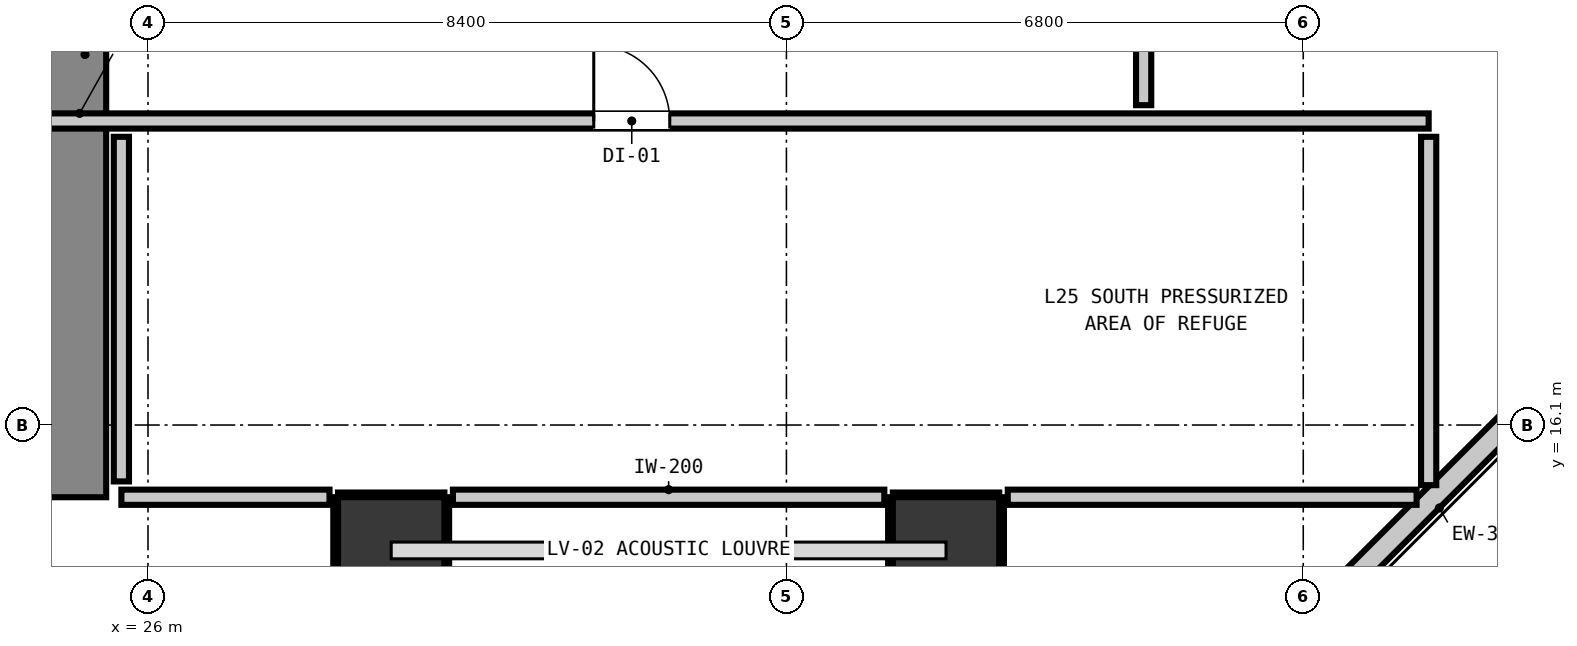
"""IFC4 building model, lengths in metres.
Left out: names, types, materials, properties, quantities, classifications, styles, units other than length and angle.
Written with IfcOpenShell. Run it as: python <this file> out.ifc"""

import sys

from ifc_helpers import new_model, si_unit, direction, frame, frame_2d, origin, origin_2d, place, context, subcontext, project, spatial, rectangle, extrude, element, fill, save


model = new_model("IFC4")
c1 = context("Model", 3, precision=1e-05, world=origin(), true_north=direction((0.0, 1.0)))
c2 = subcontext(c1, "Body", "Model", "MODEL_VIEW")
j1 = project(units=[si_unit("LENGTHUNIT", "METRE"), si_unit("PLANEANGLEUNIT", "RADIAN")], contexts=[c1])
p1 = place(None, origin())
s1 = spatial("IfcSite", under=j1, at=p1, CompositionType="ELEMENT")
p2 = place(p1, origin())
s2 = spatial("IfcBuilding", under=s1, at=p2, CompositionType="ELEMENT")
p3 = place(p2, frame((0.0, 0.0, 88.4)))
s3 = spatial("IfcBuildingStorey", under=s2, at=p3, CompositionType="ELEMENT", Elevation=88.4)
for number, where, z_axis, x_axis in (
    (1, (29.2, 14.45, 0.0), (0.0, 0.0, 1.0), (1.0, 0.0, 0.0)),
    (2, (36.5, 14.45, 0.0), (0.0, 0.0, 1.0), (1.0, 0.0, 0.0)),
):
    element("IfcColumn", number, at=place(p3, frame(where, z_axis=z_axis, x_axis=x_axis)), inside=s3, PredefinedType="COLUMN", context=c2, shape_type="SweptSolid", body=[
        extrude(rectangle(XDim=1.4, YDim=1.4, at=origin_2d()), origin(), (0.0, 0.0, 1.0), 4.4),
    ])
p4 = place(p3, frame((25.0, 15.15, 0.0), z_axis=(0.0, 0.0, 1.0), x_axis=(0.0, 1.0, 0.0)))
e3 = element("IfcWall", 3, at=p4, inside=s3, PredefinedType="SHEAR", context=c2, shape_type="SweptSolid", body=[
    extrude(rectangle(XDim=6.25, YDim=0.9, at=frame_2d((3.125, 0.0))), origin(), (0.0, 0.0, 1.0), 4.14),
])
p5 = place(p3, frame((44.135, 16.365, 0.0), z_axis=(0.0, 0.0, 1.0), x_axis=(-0.707106781187, -0.707106781187, 0.0)))
e4 = element("IfcWall", 4, at=p5, inside=s3, PredefinedType="STANDARD", context=c2, shape_type="SweptSolid", body=[
    extrude(rectangle(XDim=3.536, YDim=0.3, at=frame_2d((1.768, 0.0))), origin(), (0.0, 0.0, 1.0), 4.14),
])
p6 = place(p3, frame((25.65, 15.15, 0.0), z_axis=(0.0, 0.0, 1.0), x_axis=(1.0, 0.0, 0.0)))
e5 = element("IfcWall", 5, at=p6, inside=s3, PredefinedType="PARTITIONING", context=c2, shape_type="SweptSolid", body=[
    extrude(rectangle(XDim=2.738, YDim=0.2, at=frame_2d((1.369, 0.0))), origin(), (0.0, 0.0, 1.0), 4.14),
])
p7 = place(p3, frame((30.012, 15.15, 0.0), z_axis=(0.0, 0.0, 1.0), x_axis=(1.0, 0.0, 0.0)))
e6 = element("IfcWall", 6, at=p7, inside=s3, PredefinedType="PARTITIONING", context=c2, shape_type="SweptSolid", body=[
    extrude(rectangle(XDim=5.676, YDim=0.2, at=frame_2d((2.838, 0.0))), origin(), (0.0, 0.0, 1.0), 4.14),
])
p8 = place(p3, frame((37.312, 15.15, 0.0), z_axis=(0.0, 0.0, 1.0), x_axis=(1.0, 0.0, 0.0)))
e7 = element("IfcWall", 7, at=p8, inside=s3, PredefinedType="PARTITIONING", context=c2, shape_type="SweptSolid", body=[
    extrude(rectangle(XDim=5.379, YDim=0.2, at=frame_2d((2.689, 0.0))), origin(), (0.0, 0.0, 1.0), 4.14),
])
p9 = place(p3, frame((12.993, 20.1, 0.0), z_axis=(0.0, 0.0, 1.0), x_axis=(1.0, 0.0, 0.0)))
e8 = element("IfcWall", 8, at=p9, inside=s3, PredefinedType="PARTITIONING", context=c2, shape_type="SweptSolid", body=[
    extrude(rectangle(XDim=29.857, YDim=0.2, at=frame_2d((14.929, 0.0))), origin(), (0.0, 0.0, 1.0), 4.14),
])
p10 = place(p9, frame((18.872, 0.0, 0.0)))
e9 = element("IfcOpeningElement", 9, at=p10, cuts=e8, PredefinedType="OPENING", context=c2, shape_type="SweptSolid", body=[
    extrude(rectangle(XDim=1.0, YDim=2.15, at=frame_2d((0.5, 1.075))), frame((0.0, 0.11, 0.0), z_axis=(0.0, -1.0, 0.0), x_axis=(1.0, 0.0, 0.0)), (0.0, 0.0, 1.0), 0.22),
])
p11 = place(p9, frame((3.842, 0.0, 0.0)))
e10 = element("IfcOpeningElement", 10, at=p11, cuts=e8, PredefinedType="OPENING", context=c2, shape_type="SweptSolid", body=[
    extrude(rectangle(XDim=1.5, YDim=2.15, at=frame_2d((0.75, 1.075))), frame((0.0, 0.11, 0.0), z_axis=(0.0, -1.0, 0.0), x_axis=(1.0, 0.0, 0.0)), (0.0, 0.0, 1.0), 0.22),
])
p12 = place(p3, frame((25.65, 15.358, 0.0), z_axis=(0.0, 0.0, 1.0), x_axis=(0.0, 1.0, 0.0)))
e11 = element("IfcWall", 11, at=p12, inside=s3, PredefinedType="PARTITIONING", context=c2, shape_type="SweptSolid", body=[
    extrude(rectangle(XDim=4.534, YDim=0.2, at=frame_2d((2.267, 0.0))), origin(), (0.0, 0.0, 1.0), 4.14),
])
p13 = place(p3, frame((39.1, 20.308, 0.0), z_axis=(0.0, 0.0, 1.0), x_axis=(0.0, 1.0, 0.0)))
e12 = element("IfcWall", 12, at=p13, inside=s3, PredefinedType="PARTITIONING", context=c2, shape_type="SweptSolid", body=[
    extrude(rectangle(XDim=1.314, YDim=0.2, at=frame_2d((0.657, 0.0))), origin(), (0.0, 0.0, 1.0), 4.14),
])
p14 = place(p3, frame((42.85, 15.309, 0.0), z_axis=(0.0, 0.0, 1.0), x_axis=(0.0, 1.0, 0.0)))
e13 = element("IfcWall", 13, at=p14, inside=s3, PredefinedType="PARTITIONING", context=c2, shape_type="SweptSolid", body=[
    extrude(rectangle(XDim=4.583, YDim=0.2, at=frame_2d((2.292, 0.0))), origin(), (0.0, 0.0, 1.0), 4.14),
])
p15 = place(p3, frame((28.5, 15.182, 0.0), z_axis=(0.0, 0.0, 1.0), x_axis=(1.0, 0.0, 0.0)))
e14 = element("IfcWall", 14, at=p15, inside=s3, PredefinedType="PARTITIONING", context=c2, shape_type="SweptSolid", body=[
    extrude(rectangle(XDim=1.4, YDim=0.06, at=frame_2d((0.7, 0.0))), origin(), (0.0, 0.0, 1.0), 1.45),
])
for number, where, z_axis, x_axis in (
    (15, (28.468, 14.03, 0.0), (0.0, 0.0, 1.0), (0.0, 1.0, 0.0)),
    (16, (29.932, 14.03, 0.0), (0.0, 0.0, 1.0), (0.0, 1.0, 0.0)),
):
    element("IfcWall", number, at=place(p3, frame(where, z_axis=z_axis, x_axis=x_axis)), inside=s3, PredefinedType="PARTITIONING", context=c2, shape_type="SweptSolid", body=[
        extrude(rectangle(XDim=1.12, YDim=0.06, at=frame_2d((0.56, 0.0))), origin(), (0.0, 0.0, 1.0), 1.45),
    ])
p16 = place(p3, frame((35.8, 15.182, 0.0), z_axis=(0.0, 0.0, 1.0), x_axis=(1.0, 0.0, 0.0)))
e17 = element("IfcWall", 17, at=p16, inside=s3, PredefinedType="PARTITIONING", context=c2, shape_type="SweptSolid", body=[
    extrude(rectangle(XDim=1.4, YDim=0.06, at=frame_2d((0.7, 0.0))), origin(), (0.0, 0.0, 1.0), 1.45),
])
for number, where, z_axis, x_axis in (
    (18, (35.768, 14.03, 0.0), (0.0, 0.0, 1.0), (0.0, 1.0, 0.0)),
    (19, (37.232, 14.03, 0.0), (0.0, 0.0, 1.0), (0.0, 1.0, 0.0)),
):
    element("IfcWall", number, at=place(p3, frame(where, z_axis=z_axis, x_axis=x_axis)), inside=s3, PredefinedType="PARTITIONING", context=c2, shape_type="SweptSolid", body=[
        extrude(rectangle(XDim=1.12, YDim=0.06, at=frame_2d((0.56, 0.0))), origin(), (0.0, 0.0, 1.0), 1.45),
    ])
p17 = place(p10, origin())
e20 = element("IfcDoor", 20, at=p17, inside=s3, OperationType="SINGLE_SWING_LEFT", PredefinedType="DOOR", context=c2, shape_type="SweptSolid", body=[
    extrude(rectangle(XDim=1.0, YDim=2.15, at=frame_2d((0.5, 1.075))), frame((0.0, 0.025, 0.0), z_axis=(0.0, -1.0, 0.0), x_axis=(1.0, 0.0, 0.0)), (0.0, 0.0, 1.0), 0.05),
])
fill(e9, e20)
save(model, sys.argv[1])
